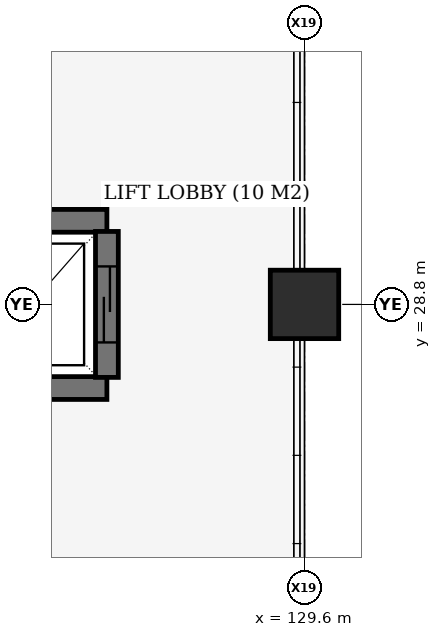
"""IFC4 building model, lengths in metres.
Left out: names, types, materials, properties, quantities, classifications, styles, units other than length and angle.
Written with IfcOpenShell. Run it as: python <this file> out.ifc"""

import sys

from ifc_helpers import new_model, si_unit, direction, frame, frame_2d, origin, origin_2d, place, context, subcontext, project, spatial, rectangle, extrude, element, fill, save


model = new_model("IFC4")
c1 = context("Model", 3, precision=1e-05, world=origin(), true_north=direction((0.0, 1.0)))
c2 = subcontext(c1, "Body", "Model", "MODEL_VIEW")
j1 = project(units=[si_unit("LENGTHUNIT", "METRE"), si_unit("PLANEANGLEUNIT", "RADIAN")], contexts=[c1])
p1 = place(None, origin())
s1 = spatial("IfcSite", under=j1, at=p1, CompositionType="ELEMENT")
p2 = place(p1, origin())
s2 = spatial("IfcBuilding", under=s1, at=p2, CompositionType="ELEMENT")
p3 = place(p2, frame((0.0, 0.0, 5.4)))
s3 = spatial("IfcBuildingStorey", under=s2, at=p3, CompositionType="ELEMENT", Elevation=5.4)
p4 = place(p3, frame((129.6, 28.8, 0.0), z_axis=(0.0, 0.0, 1.0), x_axis=(1.0, 0.0, 0.0)))
e1 = element("IfcColumn", 1, at=p4, inside=s3, PredefinedType="COLUMN", context=c2, shape_type="SweptSolid", body=[
    extrude(rectangle(XDim=0.9, YDim=0.9, at=origin_2d()), origin(), (0.0, 0.0, 1.0), 3.85),
])
for number, where, z_axis, x_axis in (
    (2, (125.0, 27.7, 0.0), (0.0, 0.0, 1.0), (1.0, 0.0, 0.0)),
    (3, (127.0, 29.9, 0.0), (0.0, 0.0, 1.0), (-1.0, 0.0, 0.0)),
):
    element("IfcWall", number, at=place(p3, frame(where, z_axis=z_axis, x_axis=x_axis)), inside=s3, PredefinedType="SHEAR", context=c2, shape_type="SweptSolid", body=[
        extrude(rectangle(XDim=2.0, YDim=0.3, at=frame_2d((1.0, 0.0))), origin(), (0.0, 0.0, 1.0), 3.85),
    ])
p5 = place(p3, frame((127.0, 29.76, 0.0), z_axis=(0.0, 0.0, 1.0), x_axis=(0.0, -1.0, 0.0)))
e4 = element("IfcWall", 4, at=p5, inside=s3, PredefinedType="SHEAR", context=c2, shape_type="SweptSolid", body=[
    extrude(rectangle(XDim=1.92, YDim=0.3, at=frame_2d((0.96, 0.0))), origin(), (0.0, 0.0, 1.0), 3.85),
])
p6 = place(p5, frame((0.46, 0.0, 0.0)))
e5 = element("IfcOpeningElement", 5, at=p6, cuts=e4, PredefinedType="OPENING", context=c2, shape_type="SweptSolid", body=[
    extrude(rectangle(XDim=1.0, YDim=2.1, at=frame_2d((0.5, 1.05))), frame((0.0, 0.16, 0.0), z_axis=(0.0, -1.0, 0.0), x_axis=(1.0, 0.0, 0.0)), (0.0, 0.0, 1.0), 0.32),
])
p7 = place(p6, origin())
e6 = element("IfcDoor", 6, at=p7, inside=s3, OperationType="SLIDING_TO_LEFT", PredefinedType="DOOR", context=c2, shape_type="SweptSolid", body=[
    extrude(rectangle(XDim=1.0, YDim=2.1, at=frame_2d((0.5, 1.05))), frame((0.0, 0.025, 0.0), z_axis=(0.0, -1.0, 0.0), x_axis=(1.0, 0.0, 0.0)), (0.0, 0.0, 1.0), 0.05),
])
fill(e5, e6)
save(model, sys.argv[1])
